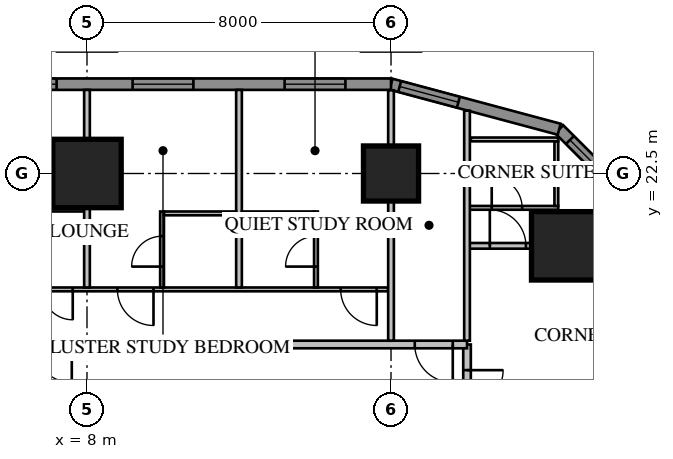
"""IFC4 building model, lengths in metres.
Left out: names, types, materials, properties, quantities, classifications, styles, units other than length and angle.
Written with IfcOpenShell. Run it as: python <this file> out.ifc"""

import sys

from ifc_helpers import new_model, si_unit, direction, frame, frame_2d, origin, origin_2d, place, context, subcontext, project, spatial, rectangle, extrude, element, fill, save


model = new_model("IFC4")
c1 = context("Model", 3, precision=1e-05, world=origin(), true_north=direction((0.0, 1.0)))
c2 = subcontext(c1, "Body", "Model", "MODEL_VIEW")
j1 = project(units=[si_unit("LENGTHUNIT", "METRE"), si_unit("PLANEANGLEUNIT", "RADIAN")], contexts=[c1])
p1 = place(None, origin())
s1 = spatial("IfcSite", under=j1, at=p1, CompositionType="ELEMENT")
p2 = place(p1, origin())
s2 = spatial("IfcBuilding", under=s1, at=p2, CompositionType="ELEMENT")
p3 = place(p2, frame((0.0, 0.0, 35.25)))
s3 = spatial("IfcBuildingStorey", under=s2, at=p3, CompositionType="ELEMENT", Elevation=35.25)
p4 = place(p3, frame((20.596, 20.596, 0.0), z_axis=(0.0, 0.0, 1.0), x_axis=(1.0, 0.0, 0.0)))
e1 = element("IfcColumn", 1, at=p4, inside=s3, PredefinedType="COLUMN", context=c2, shape_type="SweptSolid", body=[
    extrude(rectangle(XDim=1.8, YDim=1.8, at=origin_2d()), origin(), (0.0, 0.0, 1.0), 3.85),
])
p5 = place(p3, frame((16.0, 22.5, 0.0), z_axis=(0.0, 0.0, 1.0), x_axis=(1.0, 0.0, 0.0)))
e2 = element("IfcColumn", 2, at=p5, inside=s3, PredefinedType="COLUMN", context=c2, shape_type="SweptSolid", body=[
    extrude(rectangle(XDim=1.45, YDim=1.45, at=origin_2d()), origin(), (0.0, 0.0, 1.0), 3.85),
])
p6 = place(p3, frame((8.0, 22.5, 0.0), z_axis=(0.0, 0.0, 1.0), x_axis=(1.0, 0.0, 0.0)))
e3 = element("IfcColumn", 3, at=p6, inside=s3, PredefinedType="COLUMN", context=c2, shape_type="SweptSolid", body=[
    extrude(rectangle(XDim=1.8, YDim=1.8, at=origin_2d()), origin(), (0.0, 0.0, 1.0), 3.85),
])
p7 = place(p3, frame((23.664, 20.425, 0.0), z_axis=(0.0, 0.0, 1.0), x_axis=(-0.707106781187, 0.707106781187, 0.0)))
e4 = element("IfcWall", 4, at=p7, inside=s3, PredefinedType="SOLIDWALL", context=c2, shape_type="SweptSolid", body=[
    extrude(rectangle(XDim=4.581, YDim=0.3, at=frame_2d((2.291, 0.0))), origin(), (0.0, 0.0, 1.0), 3.65),
])
p8 = place(p7, frame((0.4, 0.0, 0.75)))
e5 = element("IfcOpeningElement", 5, at=p8, cuts=e4, PredefinedType="OPENING", context=c2, shape_type="SweptSolid", body=[
    extrude(rectangle(XDim=3.781, YDim=1.8, at=frame_2d((1.891, 0.9))), frame((0.0, 0.17, 0.0), z_axis=(0.0, -1.0, 0.0), x_axis=(1.0, 0.0, 0.0)), (0.0, 0.0, 1.0), 0.34),
])
p9 = place(p3, frame((20.425, 23.664, 0.0), z_axis=(0.0, 0.0, 1.0), x_axis=(-0.965920218567, 0.258839972501, 0.0)))
e6 = element("IfcWall", 6, at=p9, inside=s3, PredefinedType="SOLIDWALL", context=c2, shape_type="SweptSolid", body=[
    extrude(rectangle(XDim=4.581, YDim=0.3, at=frame_2d((2.291, 0.0))), origin(), (0.0, 0.0, 1.0), 3.65),
])
p10 = place(p9, frame((2.746, 0.0, 0.75)))
e7 = element("IfcOpeningElement", 7, at=p10, cuts=e6, PredefinedType="OPENING", context=c2, shape_type="SweptSolid", body=[
    extrude(rectangle(XDim=1.6, YDim=1.8, at=frame_2d((0.8, 0.9))), frame((0.0, 0.17, 0.0), z_axis=(0.0, -1.0, 0.0), x_axis=(1.0, 0.0, 0.0)), (0.0, 0.0, 1.0), 0.34),
])
p11 = place(p3, frame((16.0, 24.85, 0.0), z_axis=(0.0, 0.0, 1.0), x_axis=(-1.0, 0.0, 0.0)))
e8 = element("IfcWall", 8, at=p11, inside=s3, PredefinedType="SOLIDWALL", context=c2, shape_type="SweptSolid", body=[
    extrude(rectangle(XDim=32.0, YDim=0.3, at=frame_2d((16.0, 0.0))), origin(), (0.0, 0.0, 1.0), 3.65),
])
p12 = place(p11, frame((1.2, 0.0, 0.75)))
e9 = element("IfcOpeningElement", 9, at=p12, cuts=e8, PredefinedType="OPENING", context=c2, shape_type="SweptSolid", body=[
    extrude(rectangle(XDim=1.6, YDim=1.8, at=frame_2d((0.8, 0.9))), frame((0.0, 0.17, 0.0), z_axis=(0.0, -1.0, 0.0), x_axis=(1.0, 0.0, 0.0)), (0.0, 0.0, 1.0), 0.34),
])
p13 = place(p11, frame((5.2, 0.0, 0.75)))
e10 = element("IfcOpeningElement", 10, at=p13, cuts=e8, PredefinedType="OPENING", context=c2, shape_type="SweptSolid", body=[
    extrude(rectangle(XDim=1.6, YDim=1.8, at=frame_2d((0.8, 0.9))), frame((0.0, 0.17, 0.0), z_axis=(0.0, -1.0, 0.0), x_axis=(1.0, 0.0, 0.0)), (0.0, 0.0, 1.0), 0.34),
])
p14 = place(p11, frame((17.2, 0.0, 0.75)))
e11 = element("IfcOpeningElement", 11, at=p14, cuts=e8, PredefinedType="OPENING", context=c2, shape_type="SweptSolid", body=[
    extrude(rectangle(XDim=1.6, YDim=1.8, at=frame_2d((0.8, 0.9))), frame((0.0, 0.17, 0.0), z_axis=(0.0, -1.0, 0.0), x_axis=(1.0, 0.0, 0.0)), (0.0, 0.0, 1.0), 0.34),
])
p15 = place(p11, frame((21.2, 0.0, 0.75)))
e12 = element("IfcOpeningElement", 12, at=p15, cuts=e8, PredefinedType="OPENING", context=c2, shape_type="SweptSolid", body=[
    extrude(rectangle(XDim=1.6, YDim=1.8, at=frame_2d((0.8, 0.9))), frame((0.0, 0.17, 0.0), z_axis=(0.0, -1.0, 0.0), x_axis=(1.0, 0.0, 0.0)), (0.0, 0.0, 1.0), 0.34),
])
p16 = place(p11, frame((25.2, 0.0, 0.75)))
e13 = element("IfcOpeningElement", 13, at=p16, cuts=e8, PredefinedType="OPENING", context=c2, shape_type="SweptSolid", body=[
    extrude(rectangle(XDim=1.6, YDim=1.8, at=frame_2d((0.8, 0.9))), frame((0.0, 0.17, 0.0), z_axis=(0.0, -1.0, 0.0), x_axis=(1.0, 0.0, 0.0)), (0.0, 0.0, 1.0), 0.34),
])
p17 = place(p11, frame((29.2, 0.0, 0.75)))
e14 = element("IfcOpeningElement", 14, at=p17, cuts=e8, PredefinedType="OPENING", context=c2, shape_type="SweptSolid", body=[
    extrude(rectangle(XDim=1.6, YDim=1.8, at=frame_2d((0.8, 0.9))), frame((0.0, 0.17, 0.0), z_axis=(0.0, -1.0, 0.0), x_axis=(1.0, 0.0, 0.0)), (0.0, 0.0, 1.0), 0.34),
])
p18 = place(p11, frame((8.8, 0.0, 0.75)))
e15 = element("IfcOpeningElement", 15, at=p18, cuts=e8, PredefinedType="OPENING", context=c2, shape_type="SweptSolid", body=[
    extrude(rectangle(XDim=2.4, YDim=1.8, at=frame_2d((1.2, 0.9))), frame((0.0, 0.17, 0.0), z_axis=(0.0, -1.0, 0.0), x_axis=(1.0, 0.0, 0.0)), (0.0, 0.0, 1.0), 0.34),
])
p19 = place(p11, frame((13.812, 0.0, 0.0)))
e16 = element("IfcOpeningElement", 16, at=p19, cuts=e8, PredefinedType="OPENING", context=c2, shape_type="SweptSolid", body=[
    extrude(rectangle(XDim=1.0, YDim=2.4, at=frame_2d((0.5, 1.2))), frame((0.0, 0.17, 0.0), z_axis=(0.0, -1.0, 0.0), x_axis=(1.0, 0.0, 0.0)), (0.0, 0.0, 1.0), 0.34),
])
p20 = place(p3, frame((18.0, -18.0, 0.0), z_axis=(0.0, 0.0, 1.0), x_axis=(0.0, 1.0, 0.0)))
e17 = element("IfcWall", 17, at=p20, inside=s3, PredefinedType="PARTITIONING", context=c2, shape_type="SweptSolid", body=[
    extrude(rectangle(XDim=36.0, YDim=0.2, at=frame_2d((18.0, 0.0))), origin(), (0.0, 0.0, 1.0), 3.65),
])
p21 = place(p20, frame((10.4, 0.0, 0.0)))
e18 = element("IfcOpeningElement", 18, at=p21, cuts=e17, PredefinedType="OPENING", context=c2, shape_type="SweptSolid", body=[
    extrude(rectangle(XDim=1.0, YDim=2.1, at=frame_2d((0.5, 1.05))), frame((0.0, 0.12, 0.0), z_axis=(0.0, -1.0, 0.0), x_axis=(1.0, 0.0, 0.0)), (0.0, 0.0, 1.0), 0.24),
])
p22 = place(p20, frame((0.375, 0.0, 0.0)))
e19 = element("IfcOpeningElement", 19, at=p22, cuts=e17, PredefinedType="OPENING", context=c2, shape_type="SweptSolid", body=[
    extrude(rectangle(XDim=1.0, YDim=2.1, at=frame_2d((0.5, 1.05))), frame((0.0, 0.12, 0.0), z_axis=(0.0, -1.0, 0.0), x_axis=(1.0, 0.0, 0.0)), (0.0, 0.0, 1.0), 0.24),
])
p23 = place(p20, frame((34.375, 0.0, 0.0)))
e20 = element("IfcOpeningElement", 20, at=p23, cuts=e17, PredefinedType="OPENING", context=c2, shape_type="SweptSolid", body=[
    extrude(rectangle(XDim=0.95, YDim=2.1, at=frame_2d((0.475, 1.05))), frame((0.0, 0.12, 0.0), z_axis=(0.0, -1.0, 0.0), x_axis=(1.0, 0.0, 0.0)), (0.0, 0.0, 1.0), 0.24),
])
p24 = place(p3, frame((18.065, 21.596, 0.0), z_axis=(0.0, 0.0, 1.0), x_axis=(1.0, 0.0, 0.0)))
e21 = element("IfcWall", 21, at=p24, inside=s3, PredefinedType="PARTITIONING", context=c2, shape_type="SweptSolid", body=[
    extrude(rectangle(XDim=2.335, YDim=0.1, at=frame_2d((1.167, 0.0))), origin(), (0.0, 0.0, 1.0), 3.65),
])
p25 = place(p24, frame((0.585, 0.0, 0.0)))
e22 = element("IfcOpeningElement", 22, at=p25, cuts=e21, PredefinedType="OPENING", context=c2, shape_type="SweptSolid", body=[
    extrude(rectangle(XDim=0.8, YDim=2.1, at=frame_2d((0.4, 1.05))), frame((0.0, 0.07, 0.0), z_axis=(0.0, -1.0, 0.0), x_axis=(1.0, 0.0, 0.0)), (0.0, 0.0, 1.0), 0.14),
])
p26 = place(p3, frame((20.35, 21.646, 0.0), z_axis=(0.0, 0.0, 1.0), x_axis=(0.0, 1.0, 0.0)))
e23 = element("IfcWall", 23, at=p26, inside=s3, PredefinedType="PARTITIONING", context=c2, shape_type="SweptSolid", body=[
    extrude(rectangle(XDim=1.7, YDim=0.1, at=frame_2d((0.85, 0.0))), origin(), (0.0, 0.0, 1.0), 3.65),
])
p27 = place(p3, frame((18.1, 23.396, 0.0), z_axis=(0.0, 0.0, 1.0), x_axis=(1.0, 0.0, 0.0)))
e24 = element("IfcWall", 24, at=p27, inside=s3, PredefinedType="PARTITIONING", context=c2, shape_type="SweptSolid", body=[
    extrude(rectangle(XDim=2.3, YDim=0.1, at=frame_2d((1.15, 0.0))), origin(), (0.0, 0.0, 1.0), 3.65),
])
p28 = place(p3, frame((18.065, 20.596, 0.0), z_axis=(0.0, 0.0, 1.0), x_axis=(1.0, 0.0, 0.0)))
e25 = element("IfcWall", 25, at=p28, inside=s3, PredefinedType="PARTITIONING", context=c2, shape_type="SweptSolid", body=[
    extrude(rectangle(XDim=5.209, YDim=0.15, at=frame_2d((2.604, 0.0))), origin(), (0.0, 0.0, 1.0), 3.65),
])
p29 = place(p28, frame((0.535, 0.0, 0.0)))
e26 = element("IfcOpeningElement", 26, at=p29, cuts=e25, PredefinedType="OPENING", context=c2, shape_type="SweptSolid", body=[
    extrude(rectangle(XDim=0.95, YDim=2.1, at=frame_2d((0.475, 1.05))), frame((0.0, 0.095, 0.0), z_axis=(0.0, -1.0, 0.0), x_axis=(1.0, 0.0, 0.0)), (0.0, 0.0, 1.0), 0.19),
])
p30 = place(p3, frame((18.0, 18.0, 0.0), z_axis=(0.0, 0.0, 1.0), x_axis=(-1.0, 0.0, 0.0)))
e27 = element("IfcWall", 27, at=p30, inside=s3, PredefinedType="PARTITIONING", context=c2, shape_type="SweptSolid", body=[
    extrude(rectangle(XDim=36.0, YDim=0.2, at=frame_2d((18.0, 0.0))), origin(), (0.0, 0.0, 1.0), 3.65),
])
p31 = place(p30, frame((10.4, 0.0, 0.0)))
e28 = element("IfcOpeningElement", 28, at=p31, cuts=e27, PredefinedType="OPENING", context=c2, shape_type="SweptSolid", body=[
    extrude(rectangle(XDim=1.0, YDim=2.1, at=frame_2d((0.5, 1.05))), frame((0.0, 0.12, 0.0), z_axis=(0.0, -1.0, 0.0), x_axis=(1.0, 0.0, 0.0)), (0.0, 0.0, 1.0), 0.24),
])
p32 = place(p30, frame((0.375, 0.0, 0.0)))
e29 = element("IfcOpeningElement", 29, at=p32, cuts=e27, PredefinedType="OPENING", context=c2, shape_type="SweptSolid", body=[
    extrude(rectangle(XDim=1.0, YDim=2.1, at=frame_2d((0.5, 1.05))), frame((0.0, 0.12, 0.0), z_axis=(0.0, -1.0, 0.0), x_axis=(1.0, 0.0, 0.0)), (0.0, 0.0, 1.0), 0.24),
])
p33 = place(p30, frame((34.375, 0.0, 0.0)))
e30 = element("IfcOpeningElement", 30, at=p33, cuts=e27, PredefinedType="OPENING", context=c2, shape_type="SweptSolid", body=[
    extrude(rectangle(XDim=0.95, YDim=2.1, at=frame_2d((0.475, 1.05))), frame((0.0, 0.12, 0.0), z_axis=(0.0, -1.0, 0.0), x_axis=(1.0, 0.0, 0.0)), (0.0, 0.0, 1.0), 0.24),
])
p34 = place(p3, frame((15.925, 19.45, 0.0), z_axis=(0.0, 0.0, 1.0), x_axis=(-1.0, 0.0, 0.0)))
e31 = element("IfcWall", 31, at=p34, inside=s3, PredefinedType="PARTITIONING", context=c2, shape_type="SweptSolid", body=[
    extrude(rectangle(XDim=31.85, YDim=0.1, at=frame_2d((15.925, 0.0))), origin(), (0.0, 0.0, 1.0), 3.65),
])
p35 = place(p34, frame((10.125, 0.0, 0.0)))
e32 = element("IfcOpeningElement", 32, at=p35, cuts=e31, PredefinedType="OPENING", context=c2, shape_type="SweptSolid", body=[
    extrude(rectangle(XDim=1.0, YDim=2.1, at=frame_2d((0.5, 1.05))), frame((0.0, 0.07, 0.0), z_axis=(0.0, -1.0, 0.0), x_axis=(1.0, 0.0, 0.0)), (0.0, 0.0, 1.0), 0.14),
])
p36 = place(p34, frame((8.3, 0.0, 0.0)))
e33 = element("IfcOpeningElement", 33, at=p36, cuts=e31, PredefinedType="OPENING", context=c2, shape_type="SweptSolid", body=[
    extrude(rectangle(XDim=0.8, YDim=2.1, at=frame_2d((0.4, 1.05))), frame((0.0, 0.07, 0.0), z_axis=(0.0, -1.0, 0.0), x_axis=(1.0, 0.0, 0.0)), (0.0, 0.0, 1.0), 0.14),
])
p37 = place(p34, frame((0.3, 0.0, 0.0)))
e34 = element("IfcOpeningElement", 34, at=p37, cuts=e31, PredefinedType="OPENING", context=c2, shape_type="SweptSolid", body=[
    extrude(rectangle(XDim=0.95, YDim=2.1, at=frame_2d((0.475, 1.05))), frame((0.0, 0.07, 0.0), z_axis=(0.0, -1.0, 0.0), x_axis=(1.0, 0.0, 0.0)), (0.0, 0.0, 1.0), 0.14),
])
p38 = place(p34, frame((6.175, 0.0, 0.0)))
e35 = element("IfcOpeningElement", 35, at=p38, cuts=e31, PredefinedType="OPENING", context=c2, shape_type="SweptSolid", body=[
    extrude(rectangle(XDim=0.95, YDim=2.1, at=frame_2d((0.475, 1.05))), frame((0.0, 0.07, 0.0), z_axis=(0.0, -1.0, 0.0), x_axis=(1.0, 0.0, 0.0)), (0.0, 0.0, 1.0), 0.14),
])
p39 = place(p34, frame((16.3, 0.0, 0.0)))
e36 = element("IfcOpeningElement", 36, at=p39, cuts=e31, PredefinedType="OPENING", context=c2, shape_type="SweptSolid", body=[
    extrude(rectangle(XDim=0.95, YDim=2.1, at=frame_2d((0.475, 1.05))), frame((0.0, 0.07, 0.0), z_axis=(0.0, -1.0, 0.0), x_axis=(1.0, 0.0, 0.0)), (0.0, 0.0, 1.0), 0.14),
])
p40 = place(p34, frame((22.175, 0.0, 0.0)))
e37 = element("IfcOpeningElement", 37, at=p40, cuts=e31, PredefinedType="OPENING", context=c2, shape_type="SweptSolid", body=[
    extrude(rectangle(XDim=0.95, YDim=2.1, at=frame_2d((0.475, 1.05))), frame((0.0, 0.07, 0.0), z_axis=(0.0, -1.0, 0.0), x_axis=(1.0, 0.0, 0.0)), (0.0, 0.0, 1.0), 0.14),
])
p41 = place(p34, frame((24.3, 0.0, 0.0)))
e38 = element("IfcOpeningElement", 38, at=p41, cuts=e31, PredefinedType="OPENING", context=c2, shape_type="SweptSolid", body=[
    extrude(rectangle(XDim=0.95, YDim=2.1, at=frame_2d((0.475, 1.05))), frame((0.0, 0.07, 0.0), z_axis=(0.0, -1.0, 0.0), x_axis=(1.0, 0.0, 0.0)), (0.0, 0.0, 1.0), 0.14),
])
p42 = place(p34, frame((30.175, 0.0, 0.0)))
e39 = element("IfcOpeningElement", 39, at=p42, cuts=e31, PredefinedType="OPENING", context=c2, shape_type="SweptSolid", body=[
    extrude(rectangle(XDim=0.95, YDim=2.1, at=frame_2d((0.475, 1.05))), frame((0.0, 0.07, 0.0), z_axis=(0.0, -1.0, 0.0), x_axis=(1.0, 0.0, 0.0)), (0.0, 0.0, 1.0), 0.14),
])
p43 = place(p3, frame((7.925, 21.55, 0.0), z_axis=(0.0, 0.0, 1.0), x_axis=(-1.0, 0.0, 0.0)))
e40 = element("IfcWall", 40, at=p43, inside=s3, PredefinedType="PARTITIONING", context=c2, shape_type="SweptSolid", body=[
    extrude(rectangle(XDim=1.7, YDim=0.1, at=frame_2d((0.85, 0.0))), origin(), (0.0, 0.0, 1.0), 3.65),
])
p44 = place(p3, frame((18.0, 18.1, 0.0), z_axis=(0.0, 0.0, 1.0), x_axis=(0.0, 1.0, 0.0)))
e41 = element("IfcWall", 41, at=p44, inside=s3, PredefinedType="PARTITIONING", context=c2, shape_type="SweptSolid", body=[
    extrude(rectangle(XDim=6.053, YDim=0.15, at=frame_2d((3.027, 0.0))), origin(), (0.0, 0.0, 1.0), 3.65),
])
p45 = place(p3, frame((16.0, 18.1, 0.0), z_axis=(0.0, 0.0, 1.0), x_axis=(0.0, 1.0, 0.0)))
e42 = element("IfcWall", 42, at=p45, inside=s3, PredefinedType="PARTITIONING", context=c2, shape_type="SweptSolid", body=[
    extrude(rectangle(XDim=6.589, YDim=0.15, at=frame_2d((3.295, 0.0))), origin(), (0.0, 0.0, 1.0), 3.65),
])
for number, where, z_axis, x_axis in (
    (43, (12.0, 19.5, 0.0), (0.0, 0.0, 1.0), (0.0, 1.0, 0.0)),
    (44, (8.0, 19.5, 0.0), (0.0, 0.0, 1.0), (0.0, 1.0, 0.0)),
):
    element("IfcWall", number, at=place(p3, frame(where, z_axis=z_axis, x_axis=x_axis)), inside=s3, PredefinedType="PARTITIONING", context=c2, shape_type="SweptSolid", body=[
        extrude(rectangle(XDim=5.2, YDim=0.15, at=frame_2d((2.6, 0.0))), origin(), (0.0, 0.0, 1.0), 3.65),
    ])
p46 = place(p3, frame((14.025, 19.5, 0.0), z_axis=(0.0, 0.0, 1.0), x_axis=(0.0, 1.0, 0.0)))
e45 = element("IfcWall", 45, at=p46, inside=s3, PredefinedType="PARTITIONING", context=c2, shape_type="SweptSolid", body=[
    extrude(rectangle(XDim=2.0, YDim=0.1, at=frame_2d((1.0, 0.0))), origin(), (0.0, 0.0, 1.0), 3.65),
])
p47 = place(p46, frame((0.55, 0.0, 0.0)))
e46 = element("IfcOpeningElement", 46, at=p47, cuts=e45, PredefinedType="OPENING", context=c2, shape_type="SweptSolid", body=[
    extrude(rectangle(XDim=0.8, YDim=2.1, at=frame_2d((0.4, 1.05))), frame((0.0, 0.07, 0.0), z_axis=(0.0, -1.0, 0.0), x_axis=(1.0, 0.0, 0.0)), (0.0, 0.0, 1.0), 0.14),
])
p48 = place(p3, frame((13.975, 21.45, 0.0), z_axis=(0.0, 0.0, 1.0), x_axis=(-1.0, 0.0, 0.0)))
e47 = element("IfcWall", 47, at=p48, inside=s3, PredefinedType="PARTITIONING", context=c2, shape_type="SweptSolid", body=[
    extrude(rectangle(XDim=1.9, YDim=0.1, at=frame_2d((0.95, 0.0))), origin(), (0.0, 0.0, 1.0), 3.65),
])
p49 = place(p3, frame((9.975, 19.5, 0.0), z_axis=(0.0, 0.0, 1.0), x_axis=(0.0, 1.0, 0.0)))
e48 = element("IfcWall", 48, at=p49, inside=s3, PredefinedType="PARTITIONING", context=c2, shape_type="SweptSolid", body=[
    extrude(rectangle(XDim=2.0, YDim=0.1, at=frame_2d((1.0, 0.0))), origin(), (0.0, 0.0, 1.0), 3.65),
])
p50 = place(p49, frame((0.55, 0.0, 0.0)))
e49 = element("IfcOpeningElement", 49, at=p50, cuts=e48, PredefinedType="OPENING", context=c2, shape_type="SweptSolid", body=[
    extrude(rectangle(XDim=0.8, YDim=2.1, at=frame_2d((0.4, 1.05))), frame((0.0, 0.07, 0.0), z_axis=(0.0, -1.0, 0.0), x_axis=(1.0, 0.0, 0.0)), (0.0, 0.0, 1.0), 0.14),
])
p51 = place(p3, frame((11.925, 21.45, 0.0), z_axis=(0.0, 0.0, 1.0), x_axis=(-1.0, 0.0, 0.0)))
e50 = element("IfcWall", 50, at=p51, inside=s3, PredefinedType="PARTITIONING", context=c2, shape_type="SweptSolid", body=[
    extrude(rectangle(XDim=1.9, YDim=0.1, at=frame_2d((0.95, 0.0))), origin(), (0.0, 0.0, 1.0), 3.65),
])
p52 = place(p8, origin())
e51 = element("IfcWindow", 51, at=p52, inside=s3, PartitioningType="SINGLE_PANEL", PredefinedType="WINDOW", context=c2, shape_type="SweptSolid", body=[
    extrude(rectangle(XDim=3.781, YDim=1.8, at=frame_2d((1.891, 0.9))), frame((0.0, 0.03, 0.0), z_axis=(0.0, -1.0, 0.0), x_axis=(1.0, 0.0, 0.0)), (0.0, 0.0, 1.0), 0.06),
])
fill(e5, e51)
p53 = place(p10, origin())
e52 = element("IfcWindow", 52, at=p53, inside=s3, PartitioningType="SINGLE_PANEL", PredefinedType="WINDOW", context=c2, shape_type="SweptSolid", body=[
    extrude(rectangle(XDim=1.6, YDim=1.8, at=frame_2d((0.8, 0.9))), frame((0.0, 0.03, 0.0), z_axis=(0.0, -1.0, 0.0), x_axis=(1.0, 0.0, 0.0)), (0.0, 0.0, 1.0), 0.06),
])
fill(e7, e52)
p54 = place(p12, origin())
e53 = element("IfcWindow", 53, at=p54, inside=s3, PartitioningType="SINGLE_PANEL", PredefinedType="WINDOW", context=c2, shape_type="SweptSolid", body=[
    extrude(rectangle(XDim=1.6, YDim=1.8, at=frame_2d((0.8, 0.9))), frame((0.0, 0.03, 0.0), z_axis=(0.0, -1.0, 0.0), x_axis=(1.0, 0.0, 0.0)), (0.0, 0.0, 1.0), 0.06),
])
fill(e9, e53)
p55 = place(p13, origin())
e54 = element("IfcWindow", 54, at=p55, inside=s3, PartitioningType="SINGLE_PANEL", PredefinedType="WINDOW", context=c2, shape_type="SweptSolid", body=[
    extrude(rectangle(XDim=1.6, YDim=1.8, at=frame_2d((0.8, 0.9))), frame((0.0, 0.03, 0.0), z_axis=(0.0, -1.0, 0.0), x_axis=(1.0, 0.0, 0.0)), (0.0, 0.0, 1.0), 0.06),
])
fill(e10, e54)
p56 = place(p18, origin())
e55 = element("IfcWindow", 55, at=p56, inside=s3, PartitioningType="SINGLE_PANEL", PredefinedType="WINDOW", context=c2, shape_type="SweptSolid", body=[
    extrude(rectangle(XDim=2.4, YDim=1.8, at=frame_2d((1.2, 0.9))), frame((0.0, 0.03, 0.0), z_axis=(0.0, -1.0, 0.0), x_axis=(1.0, 0.0, 0.0)), (0.0, 0.0, 1.0), 0.06),
])
fill(e15, e55)
p57 = place(p23, origin())
e56 = element("IfcDoor", 56, at=p57, inside=s3, OperationType="SINGLE_SWING_RIGHT", PredefinedType="DOOR", context=c2, shape_type="SweptSolid", body=[
    extrude(rectangle(XDim=0.95, YDim=2.1, at=frame_2d((0.475, 1.05))), frame((0.0, 0.025, 0.0), z_axis=(0.0, -1.0, 0.0), x_axis=(1.0, 0.0, 0.0)), (0.0, 0.0, 1.0), 0.05),
])
fill(e20, e56)
p58 = place(p25, origin())
e57 = element("IfcDoor", 57, at=p58, inside=s3, OperationType="SINGLE_SWING_LEFT", PredefinedType="DOOR", context=c2, shape_type="SweptSolid", body=[
    extrude(rectangle(XDim=0.8, YDim=2.1, at=frame_2d((0.4, 1.05))), frame((0.0, 0.025, 0.0), z_axis=(0.0, -1.0, 0.0), x_axis=(1.0, 0.0, 0.0)), (0.0, 0.0, 1.0), 0.05),
])
fill(e22, e57)
p59 = place(p29, origin())
e58 = element("IfcDoor", 58, at=p59, inside=s3, OperationType="SINGLE_SWING_LEFT", PredefinedType="DOOR", context=c2, shape_type="SweptSolid", body=[
    extrude(rectangle(XDim=0.95, YDim=2.1, at=frame_2d((0.475, 1.05))), frame((0.0, 0.025, 0.0), z_axis=(0.0, -1.0, 0.0), x_axis=(1.0, 0.0, 0.0)), (0.0, 0.0, 1.0), 0.05),
])
fill(e26, e58)
p60 = place(p31, origin())
e59 = element("IfcDoor", 59, at=p60, inside=s3, OperationType="SINGLE_SWING_LEFT", PredefinedType="DOOR", context=c2, shape_type="SweptSolid", body=[
    extrude(rectangle(XDim=1.0, YDim=2.1, at=frame_2d((0.5, 1.05))), frame((0.0, 0.025, 0.0), z_axis=(0.0, -1.0, 0.0), x_axis=(1.0, 0.0, 0.0)), (0.0, 0.0, 1.0), 0.05),
])
fill(e28, e59)
p61 = place(p36, origin())
e60 = element("IfcDoor", 60, at=p61, inside=s3, OperationType="SINGLE_SWING_LEFT", PredefinedType="DOOR", context=c2, shape_type="SweptSolid", body=[
    extrude(rectangle(XDim=0.8, YDim=2.1, at=frame_2d((0.4, 1.05))), frame((0.0, 0.025, 0.0), z_axis=(0.0, -1.0, 0.0), x_axis=(1.0, 0.0, 0.0)), (0.0, 0.0, 1.0), 0.05),
])
fill(e33, e60)
p62 = place(p32, origin())
e61 = element("IfcDoor", 61, at=p62, inside=s3, OperationType="SINGLE_SWING_LEFT", PredefinedType="DOOR", context=c2, shape_type="SweptSolid", body=[
    extrude(rectangle(XDim=1.0, YDim=2.1, at=frame_2d((0.5, 1.05))), frame((0.0, 0.025, 0.0), z_axis=(0.0, -1.0, 0.0), x_axis=(1.0, 0.0, 0.0)), (0.0, 0.0, 1.0), 0.05),
])
fill(e29, e61)
p63 = place(p37, origin())
e62 = element("IfcDoor", 62, at=p63, inside=s3, OperationType="SINGLE_SWING_LEFT", PredefinedType="DOOR", context=c2, shape_type="SweptSolid", body=[
    extrude(rectangle(XDim=0.95, YDim=2.1, at=frame_2d((0.475, 1.05))), frame((0.0, 0.025, 0.0), z_axis=(0.0, -1.0, 0.0), x_axis=(1.0, 0.0, 0.0)), (0.0, 0.0, 1.0), 0.05),
])
fill(e34, e62)
p64 = place(p47, origin())
e63 = element("IfcDoor", 63, at=p64, inside=s3, OperationType="SINGLE_SWING_LEFT", PredefinedType="DOOR", context=c2, shape_type="SweptSolid", body=[
    extrude(rectangle(XDim=0.8, YDim=2.1, at=frame_2d((0.4, 1.05))), frame((0.0, 0.025, 0.0), z_axis=(0.0, -1.0, 0.0), x_axis=(1.0, 0.0, 0.0)), (0.0, 0.0, 1.0), 0.05),
])
fill(e46, e63)
p65 = place(p38, origin())
e64 = element("IfcDoor", 64, at=p65, inside=s3, OperationType="SINGLE_SWING_LEFT", PredefinedType="DOOR", context=c2, shape_type="SweptSolid", body=[
    extrude(rectangle(XDim=0.95, YDim=2.1, at=frame_2d((0.475, 1.05))), frame((0.0, 0.025, 0.0), z_axis=(0.0, -1.0, 0.0), x_axis=(1.0, 0.0, 0.0)), (0.0, 0.0, 1.0), 0.05),
])
fill(e35, e64)
p66 = place(p50, origin())
e65 = element("IfcDoor", 65, at=p66, inside=s3, OperationType="SINGLE_SWING_LEFT", PredefinedType="DOOR", context=c2, shape_type="SweptSolid", body=[
    extrude(rectangle(XDim=0.8, YDim=2.1, at=frame_2d((0.4, 1.05))), frame((0.0, 0.025, 0.0), z_axis=(0.0, -1.0, 0.0), x_axis=(1.0, 0.0, 0.0)), (0.0, 0.0, 1.0), 0.05),
])
fill(e49, e65)
save(model, sys.argv[1])
